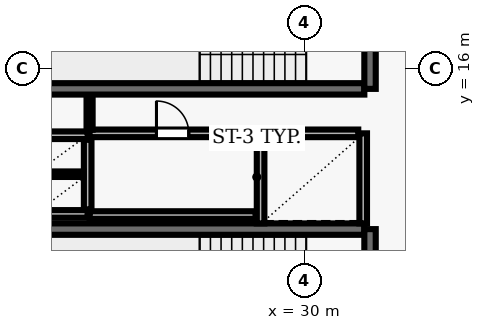
"""IFC4 building model, lengths in metres.
Left out: names, types, materials, properties, quantities, classifications, styles, units other than length and angle.
Written with IfcOpenShell. Run it as: python <this file> out.ifc"""

import sys

from ifc_helpers import new_model, si_unit, direction, frame, frame_2d, origin, place, context, subcontext, project, spatial, rectangle, extrude, element, fill, save


model = new_model("IFC4")
c1 = context("Model", 3, precision=1e-05, world=origin(), true_north=direction((0.0, 1.0)))
c2 = subcontext(c1, "Body", "Model", "MODEL_VIEW")
j1 = project(units=[si_unit("LENGTHUNIT", "METRE"), si_unit("PLANEANGLEUNIT", "RADIAN")], contexts=[c1])
p1 = place(None, origin())
s1 = spatial("IfcSite", under=j1, at=p1, CompositionType="ELEMENT")
p2 = place(p1, origin())
s2 = spatial("IfcBuilding", under=s1, at=p2, CompositionType="ELEMENT")
p3 = place(p2, frame((0.0, 0.0, 38.8)))
s3 = spatial("IfcBuildingStorey", under=s2, at=p3, CompositionType="ELEMENT", Elevation=38.8)
p4 = place(p3, frame((23.22, 15.47, 0.0), z_axis=(0.0, 0.0, 1.0), x_axis=(1.0, 0.0, 0.0)))
e1 = element("IfcWall", 1, at=p4, inside=s3, PredefinedType="SHEAR", context=c2, shape_type="SweptSolid", body=[
    extrude(rectangle(XDim=8.36, YDim=0.3, at=frame_2d((4.18, 0.0))), origin(), (0.0, 0.0, 1.0), 3.69),
])
p5 = place(p3, frame((31.73, 15.47, 0.0), z_axis=(0.0, 0.0, 1.0), x_axis=(0.0, 1.0, 0.0)))
e2 = element("IfcWall", 2, at=p5, inside=s3, PredefinedType="SHEAR", context=c2, shape_type="SweptSolid", body=[
    extrude(rectangle(XDim=3.51, YDim=0.3, at=frame_2d((1.755, 0.0))), origin(), (0.0, 0.0, 1.0), 3.69),
])
p6 = place(p5, frame((1.18, 0.0, 0.0)))
e3 = element("IfcOpeningElement", 3, at=p6, cuts=e2, PredefinedType="OPENING", context=c2, shape_type="SweptSolid", body=[
    extrude(rectangle(XDim=1.15, YDim=2.15, at=frame_2d((0.575, 1.075))), frame((0.0, 0.16, 0.0), z_axis=(0.0, -1.0, 0.0), x_axis=(1.0, 0.0, 0.0)), (0.0, 0.0, 1.0), 0.32),
])
p7 = place(p3, frame((31.58, 11.78, 0.0), z_axis=(0.0, 0.0, 1.0), x_axis=(-1.0, 0.0, 0.0)))
e4 = element("IfcWall", 4, at=p7, inside=s3, PredefinedType="SHEAR", context=c2, shape_type="SweptSolid", body=[
    extrude(rectangle(XDim=8.36, YDim=0.3, at=frame_2d((4.18, 0.0))), origin(), (0.0, 0.0, 1.0), 3.69),
])
p8 = place(p3, frame((31.73, 8.27, 0.0), z_axis=(0.0, 0.0, 1.0), x_axis=(0.0, 1.0, 0.0)))
e5 = element("IfcWall", 5, at=p8, inside=s3, PredefinedType="SHEAR", context=c2, shape_type="SweptSolid", body=[
    extrude(rectangle(XDim=3.51, YDim=0.3, at=frame_2d((1.755, 0.0))), origin(), (0.0, 0.0, 1.0), 3.69),
])
p9 = place(p8, frame((1.18, 0.0, 0.0)))
e6 = element("IfcOpeningElement", 6, at=p9, cuts=e5, PredefinedType="OPENING", context=c2, shape_type="SweptSolid", body=[
    extrude(rectangle(XDim=1.15, YDim=2.15, at=frame_2d((0.575, 1.075))), frame((0.0, 0.16, 0.0), z_axis=(0.0, -1.0, 0.0), x_axis=(1.0, 0.0, 0.0)), (0.0, 0.0, 1.0), 0.32),
])
for number, where, z_axis, x_axis in (
    (7, (28.85, 14.3, 0.0), (0.0, 0.0, 1.0), (0.0, -1.0, 0.0)),
    (8, (31.55, 11.93, 0.0), (0.0, 0.0, 1.0), (0.0, 1.0, 0.0)),
):
    element("IfcWall", number, at=place(p3, frame(where, z_axis=z_axis, x_axis=x_axis)), inside=s3, PredefinedType="SOLIDWALL", context=c2, shape_type="SweptSolid", body=[
        extrude(rectangle(XDim=2.37, YDim=0.2, at=frame_2d((1.185, 0.0))), origin(), (0.0, 0.0, 1.0), 3.69),
    ])
p10 = place(p3, frame((31.42, 14.3, 0.0), z_axis=(0.0, 0.0, 1.0), x_axis=(-1.0, 0.0, 0.0)))
e9 = element("IfcWall", 9, at=p10, inside=s3, PredefinedType="SOLIDWALL", context=c2, shape_type="SweptSolid", body=[
    extrude(rectangle(XDim=2.44, YDim=0.2, at=frame_2d((1.22, 0.0))), origin(), (0.0, 0.0, 1.0), 3.69),
])
for number, where, z_axis, x_axis in (
    (10, (22.9, 14.25, 0.0), (0.0, 0.0, 1.0), (1.0, 0.0, 0.0)),
    (11, (22.9, 12.18, 0.0), (0.0, 0.0, 1.0), (1.0, 0.0, 0.0)),
):
    element("IfcWall", number, at=place(p3, frame(where, z_axis=z_axis, x_axis=x_axis)), inside=s3, PredefinedType="SOLIDWALL", context=c2, shape_type="SweptSolid", body=[
        extrude(rectangle(XDim=1.4, YDim=0.2, at=frame_2d((0.7, 0.0))), origin(), (0.0, 0.0, 1.0), 3.69),
    ])
p11 = place(p3, frame((24.3, 12.3, 0.0), z_axis=(0.0, 0.0, 1.0), x_axis=(0.0, 1.0, 0.0)))
e12 = element("IfcWall", 12, at=p11, inside=s3, PredefinedType="SOLIDWALL", context=c2, shape_type="SweptSolid", body=[
    extrude(rectangle(XDim=1.83, YDim=0.2, at=frame_2d((0.915, 0.0))), origin(), (0.0, 0.0, 1.0), 3.69),
])
p12 = place(p3, frame((23.01, 13.225, 0.0), z_axis=(0.0, 0.0, 1.0), x_axis=(1.0, 0.0, 0.0)))
e13 = element("IfcWall", 13, at=p12, inside=s3, PredefinedType="PARTITIONING", context=c2, shape_type="SweptSolid", body=[
    extrude(rectangle(XDim=1.18, YDim=0.145, at=frame_2d((0.59, 0.0))), origin(), (0.0, 0.0, 1.0), 3.69),
])
p13 = place(p3, frame((24.35, 12.15, 0.0), z_axis=(0.0, 0.0, 1.0), x_axis=(1.0, 0.0, 0.0)))
e14 = element("IfcWall", 14, at=p13, inside=s3, PredefinedType="SOLIDWALL", context=c2, shape_type="SweptSolid", body=[
    extrude(rectangle(XDim=4.37, YDim=0.2, at=frame_2d((2.185, 0.0))), origin(), (0.0, 0.0, 1.0), 3.69),
])
p14 = place(p3, frame((24.35, 14.3, 0.0), z_axis=(0.0, 0.0, 1.0), x_axis=(1.0, 0.0, 0.0)))
e15 = element("IfcWall", 15, at=p14, inside=s3, PredefinedType="SOLIDWALL", context=c2, shape_type="SweptSolid", body=[
    extrude(rectangle(XDim=4.37, YDim=0.2, at=frame_2d((2.185, 0.0))), origin(), (0.0, 0.0, 1.0), 3.69),
])
p15 = place(p14, frame((1.76, 0.0, 0.0)))
e16 = element("IfcOpeningElement", 16, at=p15, cuts=e15, PredefinedType="OPENING", context=c2, shape_type="SweptSolid", body=[
    extrude(rectangle(XDim=0.85, YDim=2.1, at=frame_2d((0.425, 1.05))), frame((0.0, 0.11, 0.0), z_axis=(0.0, -1.0, 0.0), x_axis=(1.0, 0.0, 0.0)), (0.0, 0.0, 1.0), 0.22),
])
p16 = place(p3, frame((24.35, 15.29, 0.0), z_axis=(0.0, 0.0, 1.0), x_axis=(0.0, -1.0, 0.0)))
e17 = element("IfcWall", 17, at=p16, inside=s3, PredefinedType="PARTITIONING", context=c2, shape_type="SweptSolid", body=[
    extrude(rectangle(XDim=0.895, YDim=0.16, at=frame_2d((0.448, 0.0))), origin(), (0.0, 0.0, 1.0), 3.69),
])
p17 = place(p15, origin())
e18 = element("IfcDoor", 18, at=p17, inside=s3, OperationType="SINGLE_SWING_LEFT", PredefinedType="DOOR", context=c2, shape_type="SweptSolid", body=[
    extrude(rectangle(XDim=0.85, YDim=2.1, at=frame_2d((0.425, 1.05))), frame((0.0, 0.025, 0.0), z_axis=(0.0, -1.0, 0.0), x_axis=(1.0, 0.0, 0.0)), (0.0, 0.0, 1.0), 0.05),
])
fill(e16, e18)
save(model, sys.argv[1])
